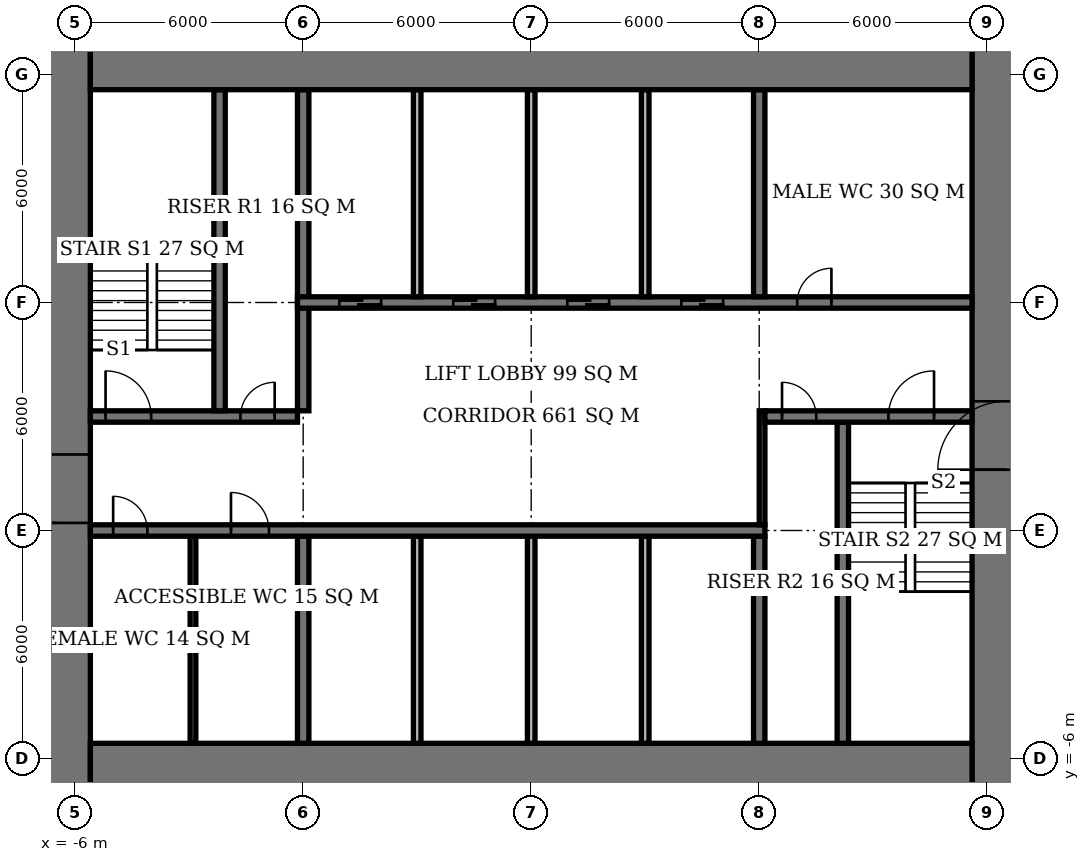
"""IFC4 building model, lengths in metres.
Left out: names, types, materials, properties, quantities, classifications, styles, units other than length and angle.
Written with IfcOpenShell. Run it as: python <this file> out.ifc"""

import sys

from ifc_helpers import new_model, si_unit, direction, frame, frame_2d, origin, place, context, subcontext, project, spatial, rectangle, extrude, element, fill, save


model = new_model("IFC4")
c1 = context("Model", 3, precision=1e-05, world=origin(), true_north=direction((0.0, 1.0)))
c2 = subcontext(c1, "Body", "Model", "MODEL_VIEW")
j1 = project(units=[si_unit("LENGTHUNIT", "METRE"), si_unit("PLANEANGLEUNIT", "RADIAN")], contexts=[c1])
p1 = place(None, origin())
s1 = spatial("IfcSite", under=j1, at=p1, CompositionType="ELEMENT")
p2 = place(p1, origin())
s2 = spatial("IfcBuilding", under=s1, at=p2, CompositionType="ELEMENT")
p3 = place(p2, frame((0.0, 0.0, 61.1)))
s3 = spatial("IfcBuildingStorey", under=s2, at=p3, CompositionType="ELEMENT", Elevation=61.1)
for number, where, z_axis, x_axis in (
    (1, (-5.6, -6.6, 0.0), (0.0, 0.0, 1.0), (1.0, 0.0, 0.0)),
    (2, (-5.6, 12.6, 0.0), (0.0, 0.0, 1.0), (1.0, 0.0, 0.0)),
):
    element("IfcWall", number, at=place(p3, frame(where, z_axis=z_axis, x_axis=x_axis)), inside=s3, PredefinedType="SHEAR", context=c2, shape_type="SweptSolid", body=[
        extrude(rectangle(XDim=23.2, YDim=2.0, at=frame_2d((11.6, 0.0))), origin(), (0.0, 0.0, 1.0), 3.9),
    ])
p4 = place(p3, frame((-6.5, -7.6, 0.0), z_axis=(0.0, 0.0, 1.0), x_axis=(0.0, 1.0, 0.0)))
e3 = element("IfcWall", 3, at=p4, inside=s3, PredefinedType="SHEAR", context=c2, shape_type="SweptSolid", body=[
    extrude(rectangle(XDim=21.2, YDim=1.8, at=frame_2d((10.6, 0.0))), origin(), (0.0, 0.0, 1.0), 3.9),
])
p5 = place(p4, frame((7.8, 0.0, 0.0)))
e4 = element("IfcOpeningElement", 4, at=p5, cuts=e3, PredefinedType="OPENING", context=c2, shape_type="SweptSolid", body=[
    extrude(rectangle(XDim=1.8, YDim=2.4, at=frame_2d((0.9, 1.2))), frame((0.0, 0.91, 0.0), z_axis=(0.0, -1.0, 0.0), x_axis=(1.0, 0.0, 0.0)), (0.0, 0.0, 1.0), 1.82),
])
p6 = place(p3, frame((18.5, -7.6, 0.0), z_axis=(0.0, 0.0, 1.0), x_axis=(0.0, 1.0, 0.0)))
e5 = element("IfcWall", 5, at=p6, inside=s3, PredefinedType="SHEAR", context=c2, shape_type="SweptSolid", body=[
    extrude(rectangle(XDim=21.2, YDim=1.8, at=frame_2d((10.6, 0.0))), origin(), (0.0, 0.0, 1.0), 3.9),
])
p7 = place(p6, frame((9.2, 0.0, 0.0)))
e6 = element("IfcOpeningElement", 6, at=p7, cuts=e5, PredefinedType="OPENING", context=c2, shape_type="SweptSolid", body=[
    extrude(rectangle(XDim=1.8, YDim=2.4, at=frame_2d((0.9, 1.2))), frame((0.0, 0.91, 0.0), z_axis=(0.0, -1.0, 0.0), x_axis=(1.0, 0.0, 0.0)), (0.0, 0.0, 1.0), 1.82),
])
p8 = place(p3, frame((-5.6, 0.0, 0.0), z_axis=(0.0, 0.0, 1.0), x_axis=(1.0, 0.0, 0.0)))
e7 = element("IfcWall", 7, at=p8, inside=s3, PredefinedType="SHEAR", context=c2, shape_type="SweptSolid", body=[
    extrude(rectangle(XDim=17.75, YDim=0.3, at=frame_2d((8.875, 0.0))), origin(), (0.0, 0.0, 1.0), 3.9),
])
p9 = place(p8, frame((0.6, 0.0, 0.0)))
e8 = element("IfcOpeningElement", 8, at=p9, cuts=e7, PredefinedType="OPENING", context=c2, shape_type="SweptSolid", body=[
    extrude(rectangle(XDim=0.9, YDim=2.1, at=frame_2d((0.45, 1.05))), frame((0.0, 0.16, 0.0), z_axis=(0.0, -1.0, 0.0), x_axis=(1.0, 0.0, 0.0)), (0.0, 0.0, 1.0), 0.32),
])
p10 = place(p8, frame((3.7, 0.0, 0.0)))
e9 = element("IfcOpeningElement", 9, at=p10, cuts=e7, PredefinedType="OPENING", context=c2, shape_type="SweptSolid", body=[
    extrude(rectangle(XDim=1.0, YDim=2.1, at=frame_2d((0.5, 1.05))), frame((0.0, 0.16, 0.0), z_axis=(0.0, -1.0, 0.0), x_axis=(1.0, 0.0, 0.0)), (0.0, 0.0, 1.0), 0.32),
])
p11 = place(p3, frame((-5.6, 3.0, 0.0), z_axis=(0.0, 0.0, 1.0), x_axis=(1.0, 0.0, 0.0)))
e10 = element("IfcWall", 10, at=p11, inside=s3, PredefinedType="SHEAR", context=c2, shape_type="SweptSolid", body=[
    extrude(rectangle(XDim=5.45, YDim=0.3, at=frame_2d((2.725, 0.0))), origin(), (0.0, 0.0, 1.0), 3.9),
])
p12 = place(p11, frame((0.4, 0.0, 0.0)))
e11 = element("IfcOpeningElement", 11, at=p12, cuts=e10, PredefinedType="OPENING", context=c2, shape_type="SweptSolid", body=[
    extrude(rectangle(XDim=1.2, YDim=2.1, at=frame_2d((0.6, 1.05))), frame((0.0, 0.16, 0.0), z_axis=(0.0, -1.0, 0.0), x_axis=(1.0, 0.0, 0.0)), (0.0, 0.0, 1.0), 0.32),
])
p13 = place(p11, frame((3.95, 0.0, 0.0)))
e12 = element("IfcOpeningElement", 12, at=p13, cuts=e10, PredefinedType="OPENING", context=c2, shape_type="SweptSolid", body=[
    extrude(rectangle(XDim=0.9, YDim=2.1, at=frame_2d((0.45, 1.05))), frame((0.0, 0.16, 0.0), z_axis=(0.0, -1.0, 0.0), x_axis=(1.0, 0.0, 0.0)), (0.0, 0.0, 1.0), 0.32),
])
p14 = place(p3, frame((12.15, 3.0, 0.0), z_axis=(0.0, 0.0, 1.0), x_axis=(1.0, 0.0, 0.0)))
e13 = element("IfcWall", 13, at=p14, inside=s3, PredefinedType="SHEAR", context=c2, shape_type="SweptSolid", body=[
    extrude(rectangle(XDim=5.45, YDim=0.3, at=frame_2d((2.725, 0.0))), origin(), (0.0, 0.0, 1.0), 3.9),
])
p15 = place(p14, frame((3.25, 0.0, 0.0)))
e14 = element("IfcOpeningElement", 14, at=p15, cuts=e13, PredefinedType="OPENING", context=c2, shape_type="SweptSolid", body=[
    extrude(rectangle(XDim=1.2, YDim=2.1, at=frame_2d((0.6, 1.05))), frame((0.0, 0.16, 0.0), z_axis=(0.0, -1.0, 0.0), x_axis=(1.0, 0.0, 0.0)), (0.0, 0.0, 1.0), 0.32),
])
p16 = place(p14, frame((0.45, 0.0, 0.0)))
e15 = element("IfcOpeningElement", 15, at=p16, cuts=e13, PredefinedType="OPENING", context=c2, shape_type="SweptSolid", body=[
    extrude(rectangle(XDim=0.9, YDim=2.1, at=frame_2d((0.45, 1.05))), frame((0.0, 0.16, 0.0), z_axis=(0.0, -1.0, 0.0), x_axis=(1.0, 0.0, 0.0)), (0.0, 0.0, 1.0), 0.32),
])
p17 = place(p3, frame((-0.15, 6.0, 0.0), z_axis=(0.0, 0.0, 1.0), x_axis=(1.0, 0.0, 0.0)))
e16 = element("IfcWall", 16, at=p17, inside=s3, PredefinedType="SHEAR", context=c2, shape_type="SweptSolid", body=[
    extrude(rectangle(XDim=17.75, YDim=0.3, at=frame_2d((8.875, 0.0))), origin(), (0.0, 0.0, 1.0), 3.9),
])
p18 = place(p17, frame((13.15, 0.0, 0.0)))
e17 = element("IfcOpeningElement", 17, at=p18, cuts=e16, PredefinedType="OPENING", context=c2, shape_type="SweptSolid", body=[
    extrude(rectangle(XDim=0.9, YDim=2.1, at=frame_2d((0.45, 1.05))), frame((0.0, 0.16, 0.0), z_axis=(0.0, -1.0, 0.0), x_axis=(1.0, 0.0, 0.0)), (0.0, 0.0, 1.0), 0.32),
])
p19 = place(p17, frame((1.1, 0.0, 0.0)))
e18 = element("IfcOpeningElement", 18, at=p19, cuts=e16, PredefinedType="OPENING", context=c2, shape_type="SweptSolid", body=[
    extrude(rectangle(XDim=1.1, YDim=2.1, at=frame_2d((0.55, 1.05))), frame((0.0, 0.16, 0.0), z_axis=(0.0, -1.0, 0.0), x_axis=(1.0, 0.0, 0.0)), (0.0, 0.0, 1.0), 0.32),
])
p20 = place(p17, frame((4.1, 0.0, 0.0)))
e19 = element("IfcOpeningElement", 19, at=p20, cuts=e16, PredefinedType="OPENING", context=c2, shape_type="SweptSolid", body=[
    extrude(rectangle(XDim=1.1, YDim=2.1, at=frame_2d((0.55, 1.05))), frame((0.0, 0.16, 0.0), z_axis=(0.0, -1.0, 0.0), x_axis=(1.0, 0.0, 0.0)), (0.0, 0.0, 1.0), 0.32),
])
p21 = place(p17, frame((7.1, 0.0, 0.0)))
e20 = element("IfcOpeningElement", 20, at=p21, cuts=e16, PredefinedType="OPENING", context=c2, shape_type="SweptSolid", body=[
    extrude(rectangle(XDim=1.1, YDim=2.1, at=frame_2d((0.55, 1.05))), frame((0.0, 0.16, 0.0), z_axis=(0.0, -1.0, 0.0), x_axis=(1.0, 0.0, 0.0)), (0.0, 0.0, 1.0), 0.32),
])
p22 = place(p17, frame((10.1, 0.0, 0.0)))
e21 = element("IfcOpeningElement", 21, at=p22, cuts=e16, PredefinedType="OPENING", context=c2, shape_type="SweptSolid", body=[
    extrude(rectangle(XDim=1.1, YDim=2.1, at=frame_2d((0.55, 1.05))), frame((0.0, 0.16, 0.0), z_axis=(0.0, -1.0, 0.0), x_axis=(1.0, 0.0, 0.0)), (0.0, 0.0, 1.0), 0.32),
])
p23 = place(p3, frame((0.0, -5.6, 0.0), z_axis=(0.0, 0.0, 1.0), x_axis=(0.0, 1.0, 0.0)))
e22 = element("IfcWall", 22, at=p23, inside=s3, PredefinedType="SHEAR", context=c2, shape_type="SweptSolid", body=[
    extrude(rectangle(XDim=5.45, YDim=0.3, at=frame_2d((2.725, 0.0))), origin(), (0.0, 0.0, 1.0), 3.9),
])
p24 = place(p3, frame((0.0, 3.15, 0.0), z_axis=(0.0, 0.0, 1.0), x_axis=(0.0, 1.0, 0.0)))
e23 = element("IfcWall", 23, at=p24, inside=s3, PredefinedType="SHEAR", context=c2, shape_type="SweptSolid", body=[
    extrude(rectangle(XDim=8.45, YDim=0.3, at=frame_2d((4.225, 0.0))), origin(), (0.0, 0.0, 1.0), 3.9),
])
for number, where, z_axis, x_axis in (
    (24, (12.0, -5.6, 0.0), (0.0, 0.0, 1.0), (0.0, 1.0, 0.0)),
    (25, (12.0, 6.15, 0.0), (0.0, 0.0, 1.0), (0.0, 1.0, 0.0)),
):
    element("IfcWall", number, at=place(p3, frame(where, z_axis=z_axis, x_axis=x_axis)), inside=s3, PredefinedType="SHEAR", context=c2, shape_type="SweptSolid", body=[
        extrude(rectangle(XDim=5.45, YDim=0.3, at=frame_2d((2.725, 0.0))), origin(), (0.0, 0.0, 1.0), 3.9),
    ])
for number, where, z_axis, x_axis in (
    (26, (-2.2, 3.15, 0.0), (0.0, 0.0, 1.0), (0.0, 1.0, 0.0)),
    (27, (14.2, -5.6, 0.0), (0.0, 0.0, 1.0), (0.0, 1.0, 0.0)),
):
    element("IfcWall", number, at=place(p3, frame(where, z_axis=z_axis, x_axis=x_axis)), inside=s3, PredefinedType="SHEAR", context=c2, shape_type="SweptSolid", body=[
        extrude(rectangle(XDim=8.45, YDim=0.3, at=frame_2d((4.225, 0.0))), origin(), (0.0, 0.0, 1.0), 3.9),
    ])
for number, where, z_axis, x_axis in (
    (28, (3.0, 6.15, 0.0), (0.0, 0.0, 1.0), (0.0, 1.0, 0.0)),
    (29, (6.0, 6.15, 0.0), (0.0, 0.0, 1.0), (0.0, 1.0, 0.0)),
    (30, (9.0, 6.15, 0.0), (0.0, 0.0, 1.0), (0.0, 1.0, 0.0)),
    (31, (3.0, -5.6, 0.0), (0.0, 0.0, 1.0), (0.0, 1.0, 0.0)),
    (32, (6.0, -5.6, 0.0), (0.0, 0.0, 1.0), (0.0, 1.0, 0.0)),
    (33, (9.0, -5.6, 0.0), (0.0, 0.0, 1.0), (0.0, 1.0, 0.0)),
):
    element("IfcWall", number, at=place(p3, frame(where, z_axis=z_axis, x_axis=x_axis)), inside=s3, PredefinedType="SOLIDWALL", context=c2, shape_type="SweptSolid", body=[
        extrude(rectangle(XDim=5.45, YDim=0.2, at=frame_2d((2.725, 0.0))), origin(), (0.0, 0.0, 1.0), 3.9),
    ])
p25 = place(p3, frame((-2.9, -5.6, 0.0), z_axis=(0.0, 0.0, 1.0), x_axis=(0.0, 1.0, 0.0)))
e34 = element("IfcWall", 34, at=p25, inside=s3, PredefinedType="PLUMBINGWALL", context=c2, shape_type="SweptSolid", body=[
    extrude(rectangle(XDim=5.45, YDim=0.15, at=frame_2d((2.725, 0.0))), origin(), (0.0, 0.0, 1.0), 3.65),
])
p26 = place(p3, frame((12.075, 0.15, 0.0), z_axis=(0.0, 0.0, 1.0), x_axis=(0.0, 1.0, 0.0)))
e35 = element("IfcWall", 35, at=p26, inside=s3, PredefinedType="PARTITIONING", context=c2, shape_type="SweptSolid", body=[
    extrude(rectangle(XDim=3.0, YDim=0.15, at=frame_2d((1.5, 0.0))), origin(), (0.0, 0.0, 1.0), 3.65),
])
p27 = place(p5, origin())
e36 = element("IfcDoor", 36, at=p27, inside=s3, OperationType="DOUBLE_DOOR_SINGLE_SWING", PredefinedType="DOOR", context=c2, shape_type="SweptSolid", body=[
    extrude(rectangle(XDim=1.8, YDim=2.4, at=frame_2d((0.9, 1.2))), frame((0.0, 0.025, 0.0), z_axis=(0.0, -1.0, 0.0), x_axis=(1.0, 0.0, 0.0)), (0.0, 0.0, 1.0), 0.05),
])
fill(e4, e36)
p28 = place(p7, origin())
e37 = element("IfcDoor", 37, at=p28, inside=s3, OperationType="DOUBLE_DOOR_SINGLE_SWING", PredefinedType="DOOR", context=c2, shape_type="SweptSolid", body=[
    extrude(rectangle(XDim=1.8, YDim=2.4, at=frame_2d((0.9, 1.2))), frame((0.0, 0.025, 0.0), z_axis=(0.0, -1.0, 0.0), x_axis=(1.0, 0.0, 0.0)), (0.0, 0.0, 1.0), 0.05),
])
fill(e6, e37)
p29 = place(p12, origin())
e38 = element("IfcDoor", 38, at=p29, inside=s3, OperationType="SINGLE_SWING_LEFT", PredefinedType="DOOR", context=c2, shape_type="SweptSolid", body=[
    extrude(rectangle(XDim=1.2, YDim=2.1, at=frame_2d((0.6, 1.05))), frame((0.0, 0.025, 0.0), z_axis=(0.0, -1.0, 0.0), x_axis=(1.0, 0.0, 0.0)), (0.0, 0.0, 1.0), 0.05),
])
fill(e11, e38)
p30 = place(p13, origin())
e39 = element("IfcDoor", 39, at=p30, inside=s3, OperationType="SINGLE_SWING_RIGHT", PredefinedType="DOOR", context=c2, shape_type="SweptSolid", body=[
    extrude(rectangle(XDim=0.9, YDim=2.1, at=frame_2d((0.45, 1.05))), frame((0.0, 0.025, 0.0), z_axis=(0.0, -1.0, 0.0), x_axis=(1.0, 0.0, 0.0)), (0.0, 0.0, 1.0), 0.05),
])
fill(e12, e39)
p31 = place(p15, origin())
e40 = element("IfcDoor", 40, at=p31, inside=s3, OperationType="SINGLE_SWING_RIGHT", PredefinedType="DOOR", context=c2, shape_type="SweptSolid", body=[
    extrude(rectangle(XDim=1.2, YDim=2.1, at=frame_2d((0.6, 1.05))), frame((0.0, 0.025, 0.0), z_axis=(0.0, -1.0, 0.0), x_axis=(1.0, 0.0, 0.0)), (0.0, 0.0, 1.0), 0.05),
])
fill(e14, e40)
p32 = place(p16, origin())
e41 = element("IfcDoor", 41, at=p32, inside=s3, OperationType="SINGLE_SWING_LEFT", PredefinedType="DOOR", context=c2, shape_type="SweptSolid", body=[
    extrude(rectangle(XDim=0.9, YDim=2.1, at=frame_2d((0.45, 1.05))), frame((0.0, 0.025, 0.0), z_axis=(0.0, -1.0, 0.0), x_axis=(1.0, 0.0, 0.0)), (0.0, 0.0, 1.0), 0.05),
])
fill(e15, e41)
p33 = place(p9, origin())
e42 = element("IfcDoor", 42, at=p33, inside=s3, OperationType="SINGLE_SWING_LEFT", PredefinedType="DOOR", context=c2, shape_type="SweptSolid", body=[
    extrude(rectangle(XDim=0.9, YDim=2.1, at=frame_2d((0.45, 1.05))), frame((0.0, 0.025, 0.0), z_axis=(0.0, -1.0, 0.0), x_axis=(1.0, 0.0, 0.0)), (0.0, 0.0, 1.0), 0.05),
])
fill(e8, e42)
p34 = place(p10, origin())
e43 = element("IfcDoor", 43, at=p34, inside=s3, OperationType="SINGLE_SWING_LEFT", PredefinedType="DOOR", context=c2, shape_type="SweptSolid", body=[
    extrude(rectangle(XDim=1.0, YDim=2.1, at=frame_2d((0.5, 1.05))), frame((0.0, 0.025, 0.0), z_axis=(0.0, -1.0, 0.0), x_axis=(1.0, 0.0, 0.0)), (0.0, 0.0, 1.0), 0.05),
])
fill(e9, e43)
p35 = place(p18, origin())
e44 = element("IfcDoor", 44, at=p35, inside=s3, OperationType="SINGLE_SWING_RIGHT", PredefinedType="DOOR", context=c2, shape_type="SweptSolid", body=[
    extrude(rectangle(XDim=0.9, YDim=2.1, at=frame_2d((0.45, 1.05))), frame((0.0, 0.025, 0.0), z_axis=(0.0, -1.0, 0.0), x_axis=(1.0, 0.0, 0.0)), (0.0, 0.0, 1.0), 0.05),
])
fill(e17, e44)
p36 = place(p19, origin())
e45 = element("IfcDoor", 45, at=p36, inside=s3, OperationType="DOUBLE_DOOR_SLIDING", PredefinedType="USERDEFINED", context=c2, shape_type="SweptSolid", body=[
    extrude(rectangle(XDim=1.1, YDim=2.1, at=frame_2d((0.55, 1.05))), frame((0.0, 0.025, 0.0), z_axis=(0.0, -1.0, 0.0), x_axis=(1.0, 0.0, 0.0)), (0.0, 0.0, 1.0), 0.05),
])
fill(e18, e45)
p37 = place(p20, origin())
e46 = element("IfcDoor", 46, at=p37, inside=s3, OperationType="DOUBLE_DOOR_SLIDING", PredefinedType="USERDEFINED", context=c2, shape_type="SweptSolid", body=[
    extrude(rectangle(XDim=1.1, YDim=2.1, at=frame_2d((0.55, 1.05))), frame((0.0, 0.025, 0.0), z_axis=(0.0, -1.0, 0.0), x_axis=(1.0, 0.0, 0.0)), (0.0, 0.0, 1.0), 0.05),
])
fill(e19, e46)
p38 = place(p21, origin())
e47 = element("IfcDoor", 47, at=p38, inside=s3, OperationType="DOUBLE_DOOR_SLIDING", PredefinedType="USERDEFINED", context=c2, shape_type="SweptSolid", body=[
    extrude(rectangle(XDim=1.1, YDim=2.1, at=frame_2d((0.55, 1.05))), frame((0.0, 0.025, 0.0), z_axis=(0.0, -1.0, 0.0), x_axis=(1.0, 0.0, 0.0)), (0.0, 0.0, 1.0), 0.05),
])
fill(e20, e47)
p39 = place(p22, origin())
e48 = element("IfcDoor", 48, at=p39, inside=s3, OperationType="DOUBLE_DOOR_SLIDING", PredefinedType="USERDEFINED", context=c2, shape_type="SweptSolid", body=[
    extrude(rectangle(XDim=1.1, YDim=2.1, at=frame_2d((0.55, 1.05))), frame((0.0, 0.025, 0.0), z_axis=(0.0, -1.0, 0.0), x_axis=(1.0, 0.0, 0.0)), (0.0, 0.0, 1.0), 0.05),
])
fill(e21, e48)
save(model, sys.argv[1])
